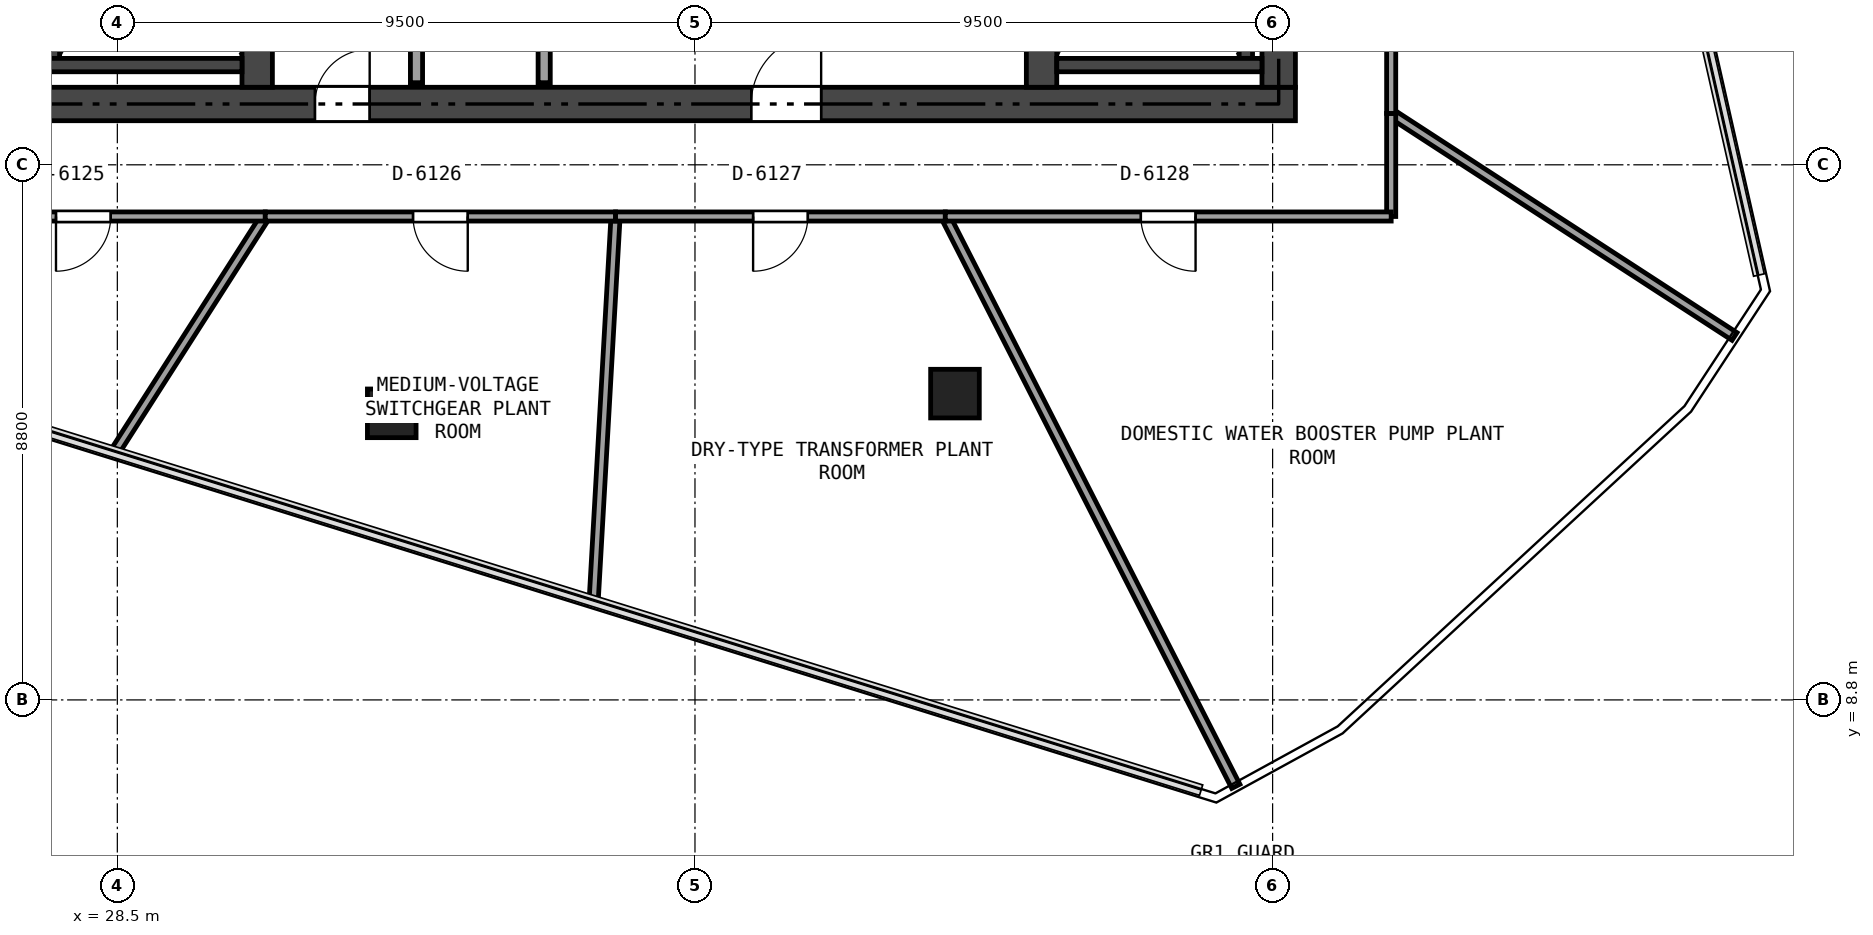
"""IFC4 building model, lengths in metres.
Left out: names, types, materials, properties, quantities, classifications, styles, units other than length and angle.
Written with IfcOpenShell. Run it as: python <this file> out.ifc"""

import sys

from ifc_helpers import new_model, si_unit, direction, frame, frame_2d, origin, origin_2d, place, context, subcontext, project, spatial, rectangle, extrude, element, fill, save


model = new_model("IFC4")
c1 = context("Model", 3, precision=1e-05, world=origin(), true_north=direction((0.0, 1.0)))
c2 = subcontext(c1, "Body", "Model", "MODEL_VIEW")
j1 = project(units=[si_unit("LENGTHUNIT", "METRE"), si_unit("PLANEANGLEUNIT", "RADIAN")], contexts=[c1])
p1 = place(None, origin())
s1 = spatial("IfcSite", under=j1, at=p1, CompositionType="ELEMENT")
p2 = place(p1, origin())
s2 = spatial("IfcBuilding", under=s1, at=p2, CompositionType="ELEMENT")
p3 = place(p2, frame((0.0, 0.0, 228.3)))
s3 = spatial("IfcBuildingStorey", under=s2, at=p3, CompositionType="ELEMENT", Elevation=228.3)
p4 = place(p3, frame((26.525, 18.6, 0.0), z_axis=(0.0, 0.0, 1.0), x_axis=(1.0, 0.0, 0.0)))
e1 = element("IfcWall", 1, at=p4, inside=s3, PredefinedType="SHEAR", context=c2, shape_type="SweptSolid", body=[
    extrude(rectangle(XDim=21.35, YDim=0.55, at=frame_2d((10.675, 0.0))), origin(), (0.0, 0.0, 1.0), 3.24),
])
p5 = place(p4, frame((12.4, 0.0, 0.0)))
e2 = element("IfcOpeningElement", 2, at=p5, cuts=e1, PredefinedType="OPENING", context=c2, shape_type="SweptSolid", body=[
    extrude(rectangle(XDim=1.15, YDim=2.15, at=frame_2d((0.575, 1.075))), frame((0.0, 0.285, 0.0), z_axis=(0.0, -1.0, 0.0), x_axis=(1.0, 0.0, 0.0)), (0.0, 0.0, 1.0), 0.57),
])
p6 = place(p4, frame((5.225, 0.0, 0.0)))
e3 = element("IfcOpeningElement", 3, at=p6, cuts=e1, PredefinedType="OPENING", context=c2, shape_type="SweptSolid", body=[
    extrude(rectangle(XDim=0.9, YDim=2.1, at=frame_2d((0.45, 1.05))), frame((0.0, 0.285, 0.0), z_axis=(0.0, -1.0, 0.0), x_axis=(1.0, 0.0, 0.0)), (0.0, 0.0, 1.0), 0.57),
])
p7 = place(p3, frame((47.6, 18.875, 0.0), z_axis=(0.0, 0.0, 1.0), x_axis=(0.0, 1.0, 0.0)))
e4 = element("IfcWall", 4, at=p7, inside=s3, PredefinedType="SHEAR", context=c2, shape_type="SweptSolid", body=[
    extrude(rectangle(XDim=15.05, YDim=0.55, at=frame_2d((7.525, 0.0))), origin(), (0.0, 0.0, 1.0), 3.24),
])
p8 = place(p7, frame((6.625, 0.0, 0.0)))
e5 = element("IfcOpeningElement", 5, at=p8, cuts=e4, PredefinedType="OPENING", context=c2, shape_type="SweptSolid", body=[
    extrude(rectangle(XDim=1.1, YDim=2.15, at=frame_2d((0.55, 1.075))), frame((0.0, 0.285, 0.0), z_axis=(0.0, -1.0, 0.0), x_axis=(1.0, 0.0, 0.0)), (0.0, 0.0, 1.0), 0.57),
])
p9 = place(p7, frame((8.525, 0.0, 0.0)))
e6 = element("IfcOpeningElement", 6, at=p9, cuts=e4, PredefinedType="OPENING", context=c2, shape_type="SweptSolid", body=[
    extrude(rectangle(XDim=0.9, YDim=2.1, at=frame_2d((0.45, 1.05))), frame((0.0, 0.285, 0.0), z_axis=(0.0, -1.0, 0.0), x_axis=(1.0, 0.0, 0.0)), (0.0, 0.0, 1.0), 0.57),
])
p10 = place(p7, frame((13.175, 0.0, 0.0)))
e7 = element("IfcOpeningElement", 7, at=p10, cuts=e4, PredefinedType="OPENING", context=c2, shape_type="SweptSolid", body=[
    extrude(rectangle(XDim=0.9, YDim=2.1, at=frame_2d((0.45, 1.05))), frame((0.0, 0.285, 0.0), z_axis=(0.0, -1.0, 0.0), x_axis=(1.0, 0.0, 0.0)), (0.0, 0.0, 1.0), 0.57),
])
p11 = place(p3, frame((30.8, 18.875, 0.0), z_axis=(0.0, 0.0, 1.0), x_axis=(0.0, 1.0, 0.0)))
e8 = element("IfcWall", 8, at=p11, inside=s3, PredefinedType="SHEAR", context=c2, shape_type="SweptSolid", body=[
    extrude(rectangle(XDim=15.05, YDim=0.5, at=frame_2d((7.525, 0.0))), origin(), (0.0, 0.0, 1.0), 3.24),
])
p12 = place(p11, frame((6.625, 0.0, 0.0)))
e9 = element("IfcOpeningElement", 9, at=p12, cuts=e8, PredefinedType="OPENING", context=c2, shape_type="SweptSolid", body=[
    extrude(rectangle(XDim=1.1, YDim=2.15, at=frame_2d((0.55, 1.075))), frame((0.0, 0.26, 0.0), z_axis=(0.0, -1.0, 0.0), x_axis=(1.0, 0.0, 0.0)), (0.0, 0.0, 1.0), 0.52),
])
p13 = place(p11, frame((8.425, 0.0, 0.0)))
e10 = element("IfcOpeningElement", 10, at=p13, cuts=e8, PredefinedType="OPENING", context=c2, shape_type="SweptSolid", body=[
    extrude(rectangle(XDim=0.9, YDim=2.1, at=frame_2d((0.45, 1.05))), frame((0.0, 0.26, 0.0), z_axis=(0.0, -1.0, 0.0), x_axis=(1.0, 0.0, 0.0)), (0.0, 0.0, 1.0), 0.52),
])
p14 = place(p3, frame((43.7, 18.875, 0.0), z_axis=(0.0, 0.0, 1.0), x_axis=(0.0, 1.0, 0.0)))
e11 = element("IfcWall", 11, at=p14, inside=s3, PredefinedType="SHEAR", context=c2, shape_type="SweptSolid", body=[
    extrude(rectangle(XDim=15.05, YDim=0.5, at=frame_2d((7.525, 0.0))), origin(), (0.0, 0.0, 1.0), 3.24),
])
p15 = place(p14, frame((8.125, 0.0, 0.0)))
e12 = element("IfcOpeningElement", 12, at=p15, cuts=e11, PredefinedType="OPENING", context=c2, shape_type="SweptSolid", body=[
    extrude(rectangle(XDim=0.9, YDim=2.1, at=frame_2d((0.45, 1.05))), frame((0.0, 0.26, 0.0), z_axis=(0.0, -1.0, 0.0), x_axis=(1.0, 0.0, 0.0)), (0.0, 0.0, 1.0), 0.52),
])
p16 = place(p3, frame((27.44, 19.35, 0.0), z_axis=(0.0, 0.0, 1.0), x_axis=(0.0, 1.0, 0.0)))
e13 = element("IfcWall", 13, at=p16, inside=s3, PredefinedType="SHEAR", context=c2, shape_type="SweptSolid", body=[
    extrude(rectangle(XDim=7.4, YDim=0.22, at=frame_2d((3.7, 0.0))), origin(), (0.0, 0.0, 1.0), 3.24),
])
p17 = place(p3, frame((27.075, 19.24, 0.0), z_axis=(0.0, 0.0, 1.0), x_axis=(1.0, 0.0, 0.0)))
e14 = element("IfcWall", 14, at=p17, inside=s3, PredefinedType="SHEAR", context=c2, shape_type="SweptSolid", body=[
    extrude(rectangle(XDim=3.475, YDim=0.22, at=frame_2d((1.738, 0.0))), origin(), (0.0, 0.0, 1.0), 3.24),
])
p18 = place(p3, frame((47.06, 19.35, 0.0), z_axis=(0.0, 0.0, 1.0), x_axis=(0.0, 1.0, 0.0)))
e15 = element("IfcWall", 15, at=p18, inside=s3, PredefinedType="SHEAR", context=c2, shape_type="SweptSolid", body=[
    extrude(rectangle(XDim=5.9, YDim=0.22, at=frame_2d((2.95, 0.0))), origin(), (0.0, 0.0, 1.0), 3.24),
])
p19 = place(p3, frame((43.95, 19.24, 0.0), z_axis=(0.0, 0.0, 1.0), x_axis=(1.0, 0.0, 0.0)))
e16 = element("IfcWall", 16, at=p19, inside=s3, PredefinedType="SHEAR", context=c2, shape_type="SweptSolid", body=[
    extrude(rectangle(XDim=3.375, YDim=0.22, at=frame_2d((1.688, 0.0))), origin(), (0.0, 0.0, 1.0), 3.24),
])
for number, where, z_axis, x_axis in (
    (17, (33.013, 13.513, -0.345), (0.0, 0.0, 1.0), (1.0, 0.0, 0.0)),
    (18, (42.276, 13.837, -0.345), (0.0, 0.0, 1.0), (1.0, 0.0, 0.0)),
):
    element("IfcColumn", number, at=place(p3, frame(where, z_axis=z_axis, x_axis=x_axis)), inside=s3, PredefinedType="COLUMN", context=c2, shape_type="SweptSolid", body=[
        extrude(rectangle(XDim=0.8, YDim=0.8, at=origin_2d()), origin(), (0.0, 0.0, 1.0), 3.585),
    ])
p20 = place(p3, frame((35.52, 18.95, 0.0), z_axis=(0.0, 0.0, 1.0), x_axis=(0.0, 1.0, 0.0)))
e19 = element("IfcWall", 19, at=p20, inside=s3, PredefinedType="SOLIDWALL", context=c2, shape_type="SweptSolid", body=[
    extrude(rectangle(XDim=14.9, YDim=0.2, at=frame_2d((7.45, 0.0))), origin(), (0.0, 0.0, 1.0), 2.761),
])
p21 = place(p20, frame((7.755, 0.0, 0.0)))
e20 = element("IfcOpeningElement", 20, at=p21, cuts=e19, PredefinedType="OPENING", context=c2, shape_type="SweptSolid", body=[
    extrude(rectangle(XDim=0.95, YDim=2.15, at=frame_2d((0.475, 1.075))), frame((0.0, 0.11, 0.0), z_axis=(0.0, -1.0, 0.0), x_axis=(1.0, 0.0, 0.0)), (0.0, 0.0, 1.0), 0.22),
])
p22 = place(p20, frame((0.6, 0.0, 0.0)))
e21 = element("IfcOpeningElement", 21, at=p22, cuts=e19, PredefinedType="OPENING", context=c2, shape_type="SweptSolid", body=[
    extrude(rectangle(XDim=0.9, YDim=2.1, at=frame_2d((0.45, 1.05))), frame((0.0, 0.11, 0.0), z_axis=(0.0, -1.0, 0.0), x_axis=(1.0, 0.0, 0.0)), (0.0, 0.0, 1.0), 0.22),
])
p23 = place(p3, frame((33.42, 18.95, 0.0), z_axis=(0.0, 0.0, 1.0), x_axis=(0.0, 1.0, 0.0)))
e22 = element("IfcWall", 22, at=p23, inside=s3, PredefinedType="SOLIDWALL", context=c2, shape_type="SweptSolid", body=[
    extrude(rectangle(XDim=6.13, YDim=0.2, at=frame_2d((3.065, 0.0))), origin(), (0.0, 0.0, 1.0), 2.761),
])
p24 = place(p3, frame((28.431, 12.837, 0.0), z_axis=(0.0, 0.0, 1.0), x_axis=(0.53872103206, 0.842484213274, 0.0)))
e23 = element("IfcWall", 23, at=p24, inside=s3, PredefinedType="PARTITIONING", context=c2, shape_type="SweptSolid", body=[
    extrude(rectangle(XDim=4.645, YDim=0.15, at=frame_2d((2.322, 0.0))), origin(), (0.0, 0.0, 1.0), 2.765),
])
p25 = place(p3, frame((30.933, 16.75, 0.0), z_axis=(0.0, 0.0, 1.0), x_axis=(-1.0, 0.0, 0.0)))
e24 = element("IfcWall", 24, at=p25, inside=s3, PredefinedType="PARTITIONING", context=c2, shape_type="SweptSolid", body=[
    extrude(rectangle(XDim=5.983, YDim=0.15, at=frame_2d((2.992, 0.0))), origin(), (0.0, 0.0, 1.0), 2.765),
])
p26 = place(p25, frame((2.542, 0.0, 0.0)))
e25 = element("IfcOpeningElement", 25, at=p26, cuts=e24, PredefinedType="OPENING", context=c2, shape_type="SweptSolid", body=[
    extrude(rectangle(XDim=0.9, YDim=2.0, at=frame_2d((0.45, 1.0))), frame((0.0, 0.085, 0.0), z_axis=(0.0, -1.0, 0.0), x_axis=(1.0, 0.0, 0.0)), (0.0, 0.0, 1.0), 0.17),
])
p27 = place(p3, frame((36.331, 10.38, 0.0), z_axis=(0.0, 0.0, 1.0), x_axis=(0.056898322383, 0.99837997822, 0.0)))
e26 = element("IfcWall", 26, at=p27, inside=s3, PredefinedType="PARTITIONING", context=c2, shape_type="SweptSolid", body=[
    extrude(rectangle(XDim=6.38, YDim=0.15, at=frame_2d((3.19, 0.0))), origin(), (0.0, 0.0, 1.0), 2.765),
])
p28 = place(p3, frame((36.694, 16.75, 0.0), z_axis=(0.0, 0.0, 1.0), x_axis=(-1.0, 0.0, 0.0)))
e27 = element("IfcWall", 27, at=p28, inside=s3, PredefinedType="PARTITIONING", context=c2, shape_type="SweptSolid", body=[
    extrude(rectangle(XDim=5.761, YDim=0.15, at=frame_2d((2.88, 0.0))), origin(), (0.0, 0.0, 1.0), 2.689),
])
p29 = place(p28, frame((2.431, 0.0, 0.0)))
e28 = element("IfcOpeningElement", 28, at=p29, cuts=e27, PredefinedType="OPENING", context=c2, shape_type="SweptSolid", body=[
    extrude(rectangle(XDim=0.9, YDim=2.0, at=frame_2d((0.45, 1.0))), frame((0.0, 0.085, 0.0), z_axis=(0.0, -1.0, 0.0), x_axis=(1.0, 0.0, 0.0)), (0.0, 0.0, 1.0), 0.17),
])
p30 = place(p3, frame((46.895, 7.379, 0.0), z_axis=(0.0, 0.0, 1.0), x_axis=(-0.454236932896, 0.890880917291, 0.0)))
e29 = element("IfcWall", 29, at=p30, inside=s3, PredefinedType="PARTITIONING", context=c2, shape_type="SweptSolid", body=[
    extrude(rectangle(XDim=10.519, YDim=0.15, at=frame_2d((5.259, 0.0))), origin(), (0.0, 0.0, 1.0), 2.765),
])
p31 = place(p3, frame((42.117, 16.75, 0.0), z_axis=(0.0, 0.0, 1.0), x_axis=(-1.0, 0.0, 0.0)))
e30 = element("IfcWall", 30, at=p31, inside=s3, PredefinedType="PARTITIONING", context=c2, shape_type="SweptSolid", body=[
    extrude(rectangle(XDim=5.423, YDim=0.15, at=frame_2d((2.711, 0.0))), origin(), (0.0, 0.0, 1.0), 2.689),
])
p32 = place(p31, frame((2.261, 0.0, 0.0)))
e31 = element("IfcOpeningElement", 31, at=p32, cuts=e30, PredefinedType="OPENING", context=c2, shape_type="SweptSolid", body=[
    extrude(rectangle(XDim=0.9, YDim=2.0, at=frame_2d((0.45, 1.0))), frame((0.0, 0.085, 0.0), z_axis=(0.0, -1.0, 0.0), x_axis=(1.0, 0.0, 0.0)), (0.0, 0.0, 1.0), 0.17),
])
p33 = place(p3, frame((55.097, 14.777, 0.0), z_axis=(0.0, 0.0, 1.0), x_axis=(-0.838617529297, 0.544720698667, 0.0)))
e32 = element("IfcWall", 32, at=p33, inside=s3, PredefinedType="PARTITIONING", context=c2, shape_type="SweptSolid", body=[
    extrude(rectangle(XDim=6.734, YDim=0.15, at=frame_2d((3.367, 0.0))), origin(), (0.0, 0.0, 1.0), 3.24),
])
p34 = place(p3, frame((49.45, 18.445, 0.0), z_axis=(0.0, 0.0, 1.0), x_axis=(0.0, -1.0, 0.0)))
e33 = element("IfcWall", 33, at=p34, inside=s3, PredefinedType="PARTITIONING", context=c2, shape_type="SweptSolid", body=[
    extrude(rectangle(XDim=1.695, YDim=0.15, at=frame_2d((0.848, 0.0))), origin(), (0.0, 0.0, 1.0), 3.24),
])
p35 = place(p3, frame((49.45, 16.75, 0.0), z_axis=(0.0, 0.0, 1.0), x_axis=(-1.0, 0.0, 0.0)))
e34 = element("IfcWall", 34, at=p35, inside=s3, PredefinedType="PARTITIONING", context=c2, shape_type="SweptSolid", body=[
    extrude(rectangle(XDim=7.333, YDim=0.15, at=frame_2d((3.667, 0.0))), origin(), (0.0, 0.0, 1.0), 2.765),
])
p36 = place(p35, frame((3.217, 0.0, 0.0)))
e35 = element("IfcOpeningElement", 35, at=p36, cuts=e34, PredefinedType="OPENING", context=c2, shape_type="SweptSolid", body=[
    extrude(rectangle(XDim=0.9, YDim=2.0, at=frame_2d((0.45, 1.0))), frame((0.0, 0.085, 0.0), z_axis=(0.0, -1.0, 0.0), x_axis=(1.0, 0.0, 0.0)), (0.0, 0.0, 1.0), 0.17),
])
p37 = place(p3, frame((49.45, 25.758, 0.0), z_axis=(0.0, 0.0, 1.0), x_axis=(0.0, -1.0, 0.0)))
e36 = element("IfcWall", 36, at=p37, inside=s3, PredefinedType="PARTITIONING", context=c2, shape_type="SweptSolid", body=[
    extrude(rectangle(XDim=7.313, YDim=0.15, at=frame_2d((3.656, 0.0))), origin(), (0.0, 0.0, 1.0), 2.689),
])
p38 = place(p37, frame((1.088, 0.0, 0.0)))
e37 = element("IfcOpeningElement", 37, at=p38, cuts=e36, PredefinedType="OPENING", context=c2, shape_type="SweptSolid", body=[
    extrude(rectangle(XDim=0.9, YDim=2.0, at=frame_2d((0.45, 1.0))), frame((0.0, 0.085, 0.0), z_axis=(0.0, -1.0, 0.0), x_axis=(1.0, 0.0, 0.0)), (0.0, 0.0, 1.0), 0.17),
])
p39 = place(p5, origin())
e38 = element("IfcDoor", 38, at=p39, inside=s3, OperationType="SINGLE_SWING_RIGHT", PredefinedType="DOOR", context=c2, shape_type="SweptSolid", body=[
    extrude(rectangle(XDim=1.15, YDim=2.15, at=frame_2d((0.575, 1.075))), frame((0.0, 0.025, 0.0), z_axis=(0.0, -1.0, 0.0), x_axis=(1.0, 0.0, 0.0)), (0.0, 0.0, 1.0), 0.05),
])
fill(e2, e38)
p40 = place(p6, origin())
e39 = element("IfcDoor", 39, at=p40, inside=s3, OperationType="SINGLE_SWING_RIGHT", PredefinedType="DOOR", context=c2, shape_type="SweptSolid", body=[
    extrude(rectangle(XDim=0.9, YDim=2.1, at=frame_2d((0.45, 1.05))), frame((0.0, 0.025, 0.0), z_axis=(0.0, -1.0, 0.0), x_axis=(1.0, 0.0, 0.0)), (0.0, 0.0, 1.0), 0.05),
])
fill(e3, e39)
p41 = place(p26, origin())
e40 = element("IfcDoor", 40, at=p41, inside=s3, OperationType="SINGLE_SWING_RIGHT", PredefinedType="DOOR", context=c2, shape_type="SweptSolid", body=[
    extrude(rectangle(XDim=0.9, YDim=2.0, at=frame_2d((0.45, 1.0))), frame((0.0, 0.025, 0.0), z_axis=(0.0, -1.0, 0.0), x_axis=(1.0, 0.0, 0.0)), (0.0, 0.0, 1.0), 0.05),
])
fill(e25, e40)
p42 = place(p29, origin())
e41 = element("IfcDoor", 41, at=p42, inside=s3, OperationType="SINGLE_SWING_LEFT", PredefinedType="DOOR", context=c2, shape_type="SweptSolid", body=[
    extrude(rectangle(XDim=0.9, YDim=2.0, at=frame_2d((0.45, 1.0))), frame((0.0, 0.025, 0.0), z_axis=(0.0, -1.0, 0.0), x_axis=(1.0, 0.0, 0.0)), (0.0, 0.0, 1.0), 0.05),
])
fill(e28, e41)
p43 = place(p32, origin())
e42 = element("IfcDoor", 42, at=p43, inside=s3, OperationType="SINGLE_SWING_RIGHT", PredefinedType="DOOR", context=c2, shape_type="SweptSolid", body=[
    extrude(rectangle(XDim=0.9, YDim=2.0, at=frame_2d((0.45, 1.0))), frame((0.0, 0.025, 0.0), z_axis=(0.0, -1.0, 0.0), x_axis=(1.0, 0.0, 0.0)), (0.0, 0.0, 1.0), 0.05),
])
fill(e31, e42)
p44 = place(p36, origin())
e43 = element("IfcDoor", 43, at=p44, inside=s3, OperationType="SINGLE_SWING_LEFT", PredefinedType="DOOR", context=c2, shape_type="SweptSolid", body=[
    extrude(rectangle(XDim=0.9, YDim=2.0, at=frame_2d((0.45, 1.0))), frame((0.0, 0.025, 0.0), z_axis=(0.0, -1.0, 0.0), x_axis=(1.0, 0.0, 0.0)), (0.0, 0.0, 1.0), 0.05),
])
fill(e35, e43)
save(model, sys.argv[1])
